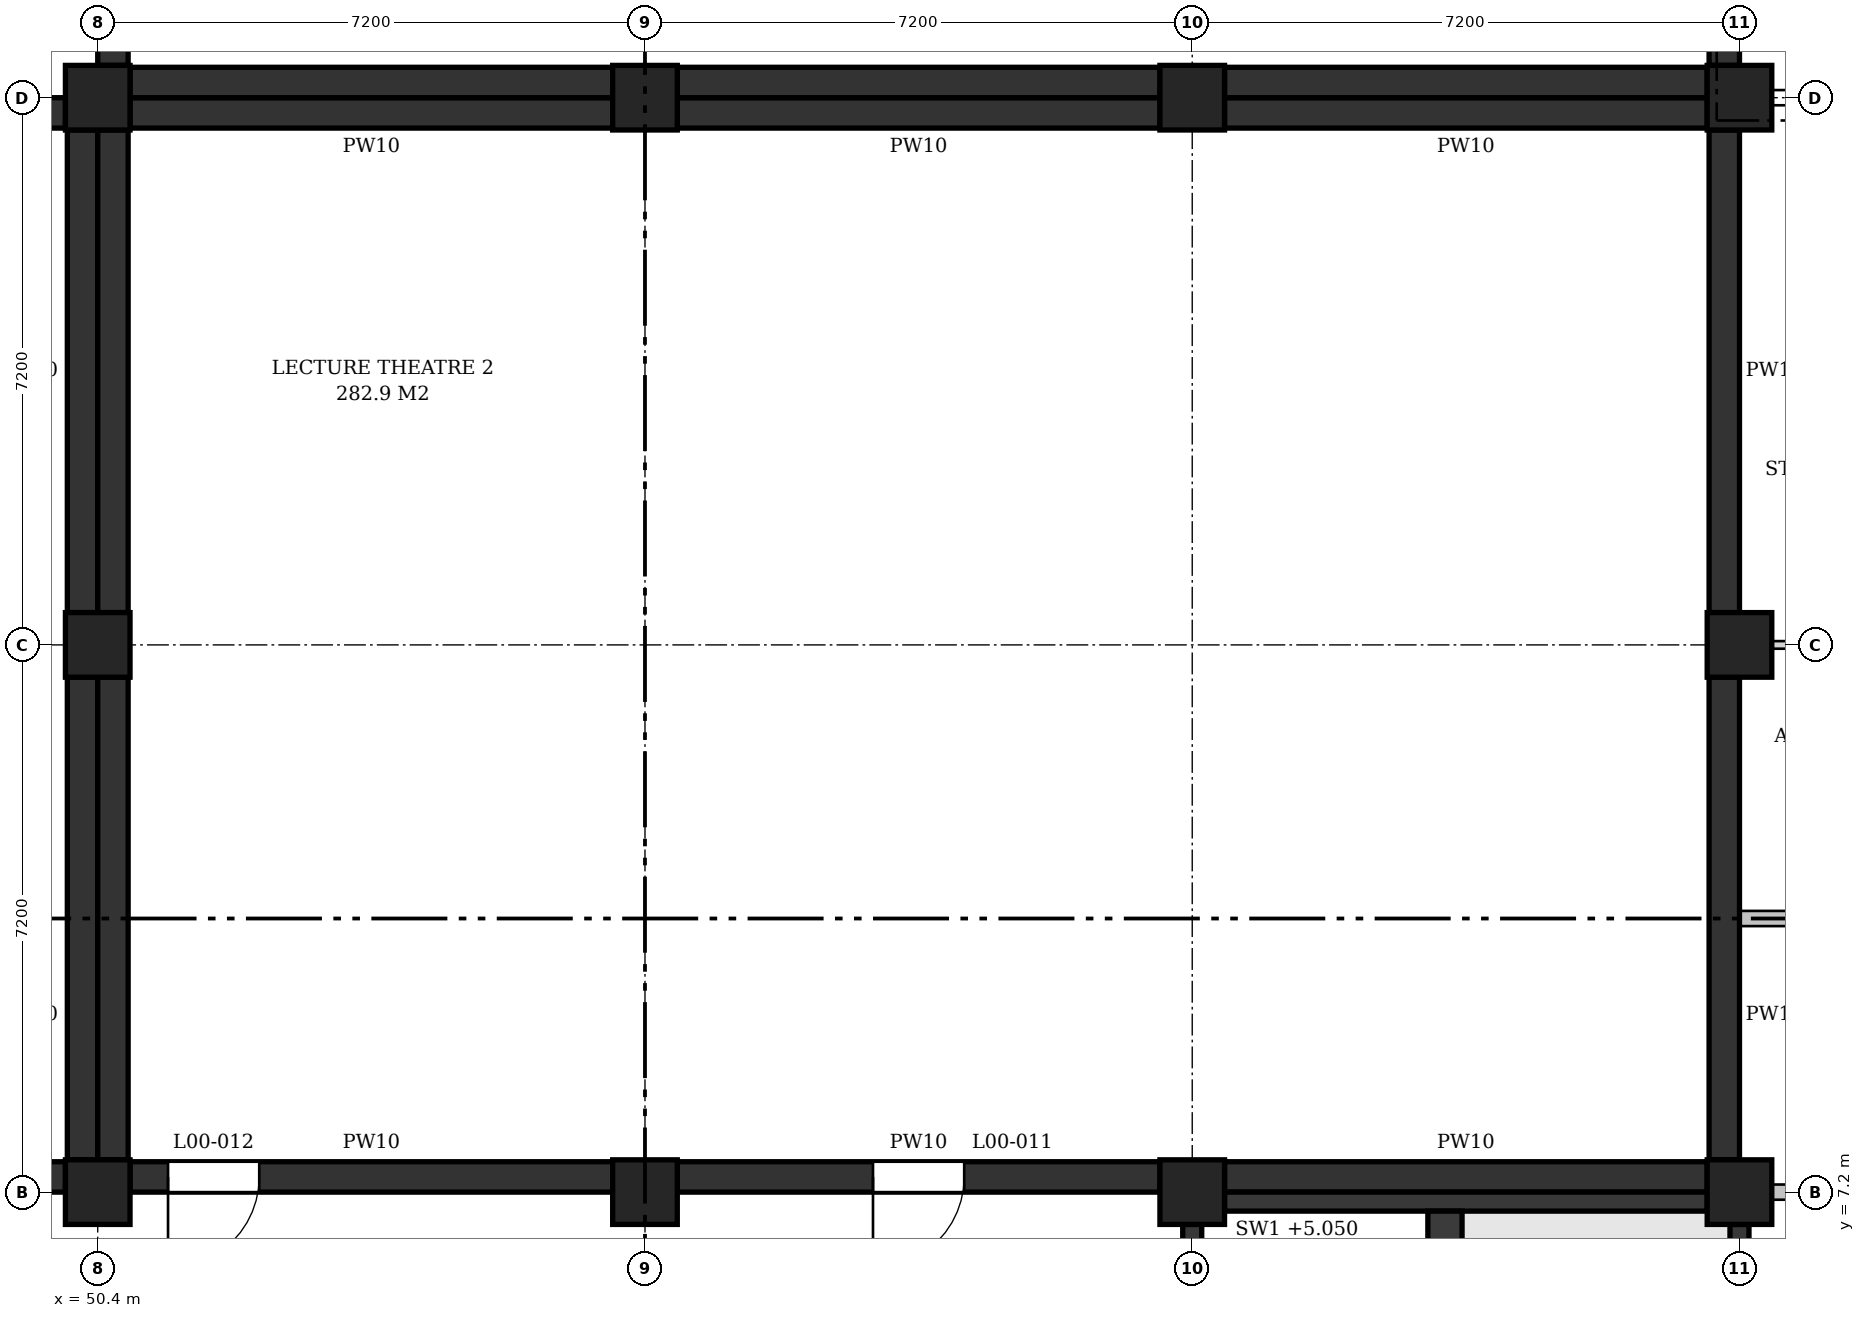
"""IFC4 building model, lengths in metres.
Left out: names, types, materials, properties, quantities, classifications, styles, units other than length and angle.
Written with IfcOpenShell. Run it as: python <this file> out.ifc"""

import sys

from ifc_helpers import new_model, si_unit, direction, frame, frame_2d, origin, origin_2d, place, context, subcontext, project, spatial, polyline, rectangle, outline, extrude, element, fill, save


model = new_model("IFC4")
c1 = context("Model", 3, precision=1e-05, world=origin(), true_north=direction((0.0, 1.0)))
c2 = subcontext(c1, "Body", "Model", "MODEL_VIEW")
j1 = project(units=[si_unit("LENGTHUNIT", "METRE"), si_unit("PLANEANGLEUNIT", "RADIAN")], contexts=[c1])
p1 = place(None, origin())
s1 = spatial("IfcSite", under=j1, at=p1, CompositionType="ELEMENT")
p2 = place(p1, origin())
s2 = spatial("IfcBuilding", under=s1, at=p2, CompositionType="ELEMENT")
p3 = place(p2, origin())
s3 = spatial("IfcBuildingStorey", under=s2, at=p3, CompositionType="ELEMENT", Elevation=0.0)
for number, where, z_axis, x_axis in (
    (1, (50.4, 7.2, 0.0), (0.0, 0.0, 1.0), (1.0, 0.0, 0.0)),
    (2, (50.4, 14.4, 0.0), (0.0, 0.0, 1.0), (1.0, 0.0, 0.0)),
    (3, (50.4, 21.6, 0.0), (0.0, 0.0, 1.0), (1.0, 0.0, 0.0)),
    (4, (57.6, 7.2, 0.0), (0.0, 0.0, 1.0), (1.0, 0.0, 0.0)),
    (5, (57.6, 21.6, 0.0), (0.0, 0.0, 1.0), (1.0, 0.0, 0.0)),
    (6, (64.8, 7.2, 0.0), (0.0, 0.0, 1.0), (1.0, 0.0, 0.0)),
    (7, (64.8, 21.6, 0.0), (0.0, 0.0, 1.0), (1.0, 0.0, 0.0)),
    (8, (72.0, 7.2, 0.0), (0.0, 0.0, 1.0), (1.0, 0.0, 0.0)),
    (9, (72.0, 14.4, 0.0), (0.0, 0.0, 1.0), (1.0, 0.0, 0.0)),
    (10, (72.0, 21.6, 0.0), (0.0, 0.0, 1.0), (1.0, 0.0, 0.0)),
):
    element("IfcColumn", number, at=place(p3, frame(where, z_axis=z_axis, x_axis=x_axis)), inside=s3, PredefinedType="COLUMN", context=c2, shape_type="SweptSolid", body=[
        extrude(rectangle(XDim=0.85, YDim=0.85, at=origin_2d()), origin(), (0.0, 0.0, 1.0), 6.0),
    ])
p4 = place(p3, frame((65.225, 7.075, 0.0), z_axis=(0.0, 0.0, 1.0), x_axis=(1.0, 0.0, 0.0)))
e11 = element("IfcWall", 11, at=p4, inside=s3, PredefinedType="SHEAR", context=c2, shape_type="SweptSolid", body=[
    extrude(rectangle(XDim=6.35, YDim=0.25, at=frame_2d((3.175, 0.0))), origin(), (0.0, 0.0, 1.0), 5.05),
])
p5 = place(p3, frame((72.0, 0.425, 0.0), z_axis=(0.0, 0.0, 1.0), x_axis=(0.0, 1.0, 0.0)))
e12 = element("IfcWall", 12, at=p5, inside=s3, PredefinedType="SHEAR", context=c2, shape_type="SweptSolid", body=[
    extrude(rectangle(XDim=6.35, YDim=0.25, at=frame_2d((3.175, 0.0))), origin(), (0.0, 0.0, 1.0), 5.0),
])
p6 = place(p3, frame((64.8, 0.425, 0.0), z_axis=(0.0, 0.0, 1.0), x_axis=(0.0, 1.0, 0.0)))
e13 = element("IfcWall", 13, at=p6, inside=s3, PredefinedType="SHEAR", context=c2, shape_type="SweptSolid", body=[
    extrude(rectangle(XDim=6.35, YDim=0.25, at=frame_2d((3.175, 0.0))), origin(), (0.0, 0.0, 1.0), 5.0),
])
p7 = place(p6, frame((3.975, 0.0, 0.0)))
e14 = element("IfcOpeningElement", 14, at=p7, cuts=e13, PredefinedType="OPENING", context=c2, shape_type="SweptSolid", body=[
    extrude(rectangle(XDim=1.1, YDim=2.1, at=frame_2d((0.55, 1.05))), frame((0.0, 0.135, 0.0), z_axis=(0.0, -1.0, 0.0), x_axis=(1.0, 0.0, 0.0)), (0.0, 0.0, 1.0), 0.27),
])
p8 = place(p3, frame((68.125, 0.15, 0.0), z_axis=(0.0, 0.0, 1.0), x_axis=(0.0, 1.0, 0.0)))
e15 = element("IfcWall", 15, at=p8, inside=s3, PredefinedType="SHEAR", context=c2, shape_type="SweptSolid", body=[
    extrude(rectangle(XDim=6.8, YDim=0.45, at=frame_2d((3.4, 0.0))), origin(), (0.0, 0.0, 1.0), 5.75),
])
p9 = place(p8, frame((5.4, 0.0, 0.0)))
e16 = element("IfcOpeningElement", 16, at=p9, cuts=e15, PredefinedType="OPENING", context=c2, shape_type="SweptSolid", body=[
    extrude(rectangle(XDim=1.0, YDim=2.1, at=frame_2d((0.5, 1.05))), frame((0.0, 0.235, 0.0), z_axis=(0.0, -1.0, 0.0), x_axis=(1.0, 0.0, 0.0)), (0.0, 0.0, 1.0), 0.47),
])
p10 = place(p3, frame((72.425, 7.2, 0.0), z_axis=(0.0, 0.0, 1.0), x_axis=(1.0, 0.0, 0.0)))
e17 = element("IfcWall", 17, at=p10, inside=s3, PredefinedType="PARTITIONING", context=c2, shape_type="SweptSolid", body=[
    extrude(rectangle(XDim=6.35, YDim=0.2, at=frame_2d((3.175, 0.0))), origin(), (0.0, 0.0, 1.0), 5.0),
])
p11 = place(p10, frame((2.675, 0.0, 0.0)))
e18 = element("IfcOpeningElement", 18, at=p11, cuts=e17, PredefinedType="OPENING", context=c2, shape_type="SweptSolid", body=[
    extrude(rectangle(XDim=1.0, YDim=2.1, at=frame_2d((0.5, 1.05))), frame((0.0, 0.11, 0.0), z_axis=(0.0, -1.0, 0.0), x_axis=(1.0, 0.0, 0.0)), (0.0, 0.0, 1.0), 0.22),
])
p12 = place(p3, frame((43.625, 7.4, 0.0), z_axis=(0.0, 0.0, 1.0), x_axis=(1.0, 0.0, 0.0)))
e19 = element("IfcWall", 19, at=p12, inside=s3, PredefinedType="SOLIDWALL", context=c2, shape_type="SweptSolid", body=[
    extrude(rectangle(XDim=6.35, YDim=0.4, at=frame_2d((3.175, 0.0))), origin(), (0.0, 0.0, 1.0), 10.7),
])
p13 = place(p12, frame((2.575, 0.0, 0.0)))
e20 = element("IfcOpeningElement", 20, at=p13, cuts=e19, PredefinedType="OPENING", context=c2, shape_type="SweptSolid", body=[
    extrude(rectangle(XDim=1.2, YDim=2.1, at=frame_2d((0.6, 1.05))), frame((0.0, 0.21, 0.0), z_axis=(0.0, -1.0, 0.0), x_axis=(1.0, 0.0, 0.0)), (0.0, 0.0, 1.0), 0.42),
])
p14 = place(p3, frame((50.825, 7.4, 0.0), z_axis=(0.0, 0.0, 1.0), x_axis=(1.0, 0.0, 0.0)))
e21 = element("IfcWall", 21, at=p14, inside=s3, PredefinedType="SOLIDWALL", context=c2, shape_type="SweptSolid", body=[
    extrude(rectangle(XDim=6.35, YDim=0.4, at=frame_2d((3.175, 0.0))), origin(), (0.0, 0.0, 1.0), 10.7),
])
p15 = place(p14, frame((0.5, 0.0, 0.0)))
e22 = element("IfcOpeningElement", 22, at=p15, cuts=e21, PredefinedType="OPENING", context=c2, shape_type="SweptSolid", body=[
    extrude(rectangle(XDim=1.2, YDim=2.1, at=frame_2d((0.6, 1.05))), frame((0.0, 0.21, 0.0), z_axis=(0.0, -1.0, 0.0), x_axis=(1.0, 0.0, 0.0)), (0.0, 0.0, 1.0), 0.42),
])
p16 = place(p3, frame((58.025, 7.4, 0.0), z_axis=(0.0, 0.0, 1.0), x_axis=(1.0, 0.0, 0.0)))
e23 = element("IfcWall", 23, at=p16, inside=s3, PredefinedType="SOLIDWALL", context=c2, shape_type="SweptSolid", body=[
    extrude(rectangle(XDim=6.35, YDim=0.4, at=frame_2d((3.175, 0.0))), origin(), (0.0, 0.0, 1.0), 10.7),
])
p17 = place(p16, frame((2.575, 0.0, 0.0)))
e24 = element("IfcOpeningElement", 24, at=p17, cuts=e23, PredefinedType="OPENING", context=c2, shape_type="SweptSolid", body=[
    extrude(rectangle(XDim=1.2, YDim=2.1, at=frame_2d((0.6, 1.05))), frame((0.0, 0.21, 0.0), z_axis=(0.0, -1.0, 0.0), x_axis=(1.0, 0.0, 0.0)), (0.0, 0.0, 1.0), 0.42),
])
p18 = place(p3, frame((65.225, 7.4, 0.0), z_axis=(0.0, 0.0, 1.0), x_axis=(1.0, 0.0, 0.0)))
e25 = element("IfcWall", 25, at=p18, inside=s3, PredefinedType="SOLIDWALL", context=c2, shape_type="SweptSolid", body=[
    extrude(rectangle(XDim=6.35, YDim=0.4, at=frame_2d((3.175, 0.0))), origin(), (0.0, 0.0, 1.0), 10.7),
])
p19 = place(p3, frame((72.0, 10.8, 0.0), z_axis=(0.0, 0.0, 1.0), x_axis=(1.0, 0.0, 0.0)))
e26 = element("IfcWall", 26, at=p19, inside=s3, PredefinedType="PARTITIONING", context=c2, shape_type="SweptSolid", body=[
    extrude(outline(polyline([(0.0, 0.0), (7.3, 0.0), (7.3, 5.0), (6.95, 5.0), (6.95, 5.75), (0.55, 5.75), (0.55, 5.05), (0.0, 5.05), (0.0, 0.0)])), frame((0.0, 0.1, 0.0), z_axis=(0.0, -1.0, 0.0), x_axis=(1.0, 0.0, 0.0)), (0.0, 0.0, 1.0), 0.2),
])
p20 = place(p19, frame((1.3, 0.0, 0.0)))
e27 = element("IfcOpeningElement", 27, at=p20, cuts=e26, PredefinedType="OPENING", context=c2, shape_type="SweptSolid", body=[
    extrude(rectangle(XDim=1.0, YDim=2.1, at=frame_2d((0.5, 1.05))), frame((0.0, 0.11, 0.0), z_axis=(0.0, -1.0, 0.0), x_axis=(1.0, 0.0, 0.0)), (0.0, 0.0, 1.0), 0.22),
])
p21 = place(p19, frame((4.9, 0.0, 0.0)))
e28 = element("IfcOpeningElement", 28, at=p21, cuts=e26, PredefinedType="OPENING", context=c2, shape_type="SweptSolid", body=[
    extrude(rectangle(XDim=1.0, YDim=2.1, at=frame_2d((0.5, 1.05))), frame((0.0, 0.11, 0.0), z_axis=(0.0, -1.0, 0.0), x_axis=(1.0, 0.0, 0.0)), (0.0, 0.0, 1.0), 0.22),
])
p22 = place(p3, frame((72.425, 14.4, 0.0), z_axis=(0.0, 0.0, 1.0), x_axis=(1.0, 0.0, 0.0)))
e29 = element("IfcWall", 29, at=p22, inside=s3, PredefinedType="PARTITIONING", context=c2, shape_type="SweptSolid", body=[
    extrude(rectangle(XDim=3.175, YDim=0.1, at=frame_2d((1.587, 0.0))), origin(), (0.0, 0.0, 1.0), 5.0),
])
p23 = place(p3, frame((43.625, 21.4, 0.0), z_axis=(0.0, 0.0, 1.0), x_axis=(1.0, 0.0, 0.0)))
e30 = element("IfcWall", 30, at=p23, inside=s3, PredefinedType="SOLIDWALL", context=c2, shape_type="SweptSolid", body=[
    extrude(rectangle(XDim=6.35, YDim=0.4, at=frame_2d((3.175, 0.0))), origin(), (0.0, 0.0, 1.0), 10.7),
])
p24 = place(p23, frame((2.175, 0.0, 0.0)))
e31 = element("IfcOpeningElement", 31, at=p24, cuts=e30, PredefinedType="OPENING", context=c2, shape_type="SweptSolid", body=[
    extrude(rectangle(XDim=2.0, YDim=2.4, at=frame_2d((1.0, 1.2))), frame((0.0, 0.21, 0.0), z_axis=(0.0, -1.0, 0.0), x_axis=(1.0, 0.0, 0.0)), (0.0, 0.0, 1.0), 0.42),
])
for number, where, z_axis, x_axis in (
    (32, (50.825, 21.4, 0.0), (0.0, 0.0, 1.0), (1.0, 0.0, 0.0)),
    (33, (58.025, 21.4, 0.0), (0.0, 0.0, 1.0), (1.0, 0.0, 0.0)),
):
    element("IfcWall", number, at=place(p3, frame(where, z_axis=z_axis, x_axis=x_axis)), inside=s3, PredefinedType="SOLIDWALL", context=c2, shape_type="SweptSolid", body=[
        extrude(rectangle(XDim=6.35, YDim=0.4, at=frame_2d((3.175, 0.0))), origin(), (0.0, 0.0, 1.0), 10.7),
    ])
p25 = place(p3, frame((65.225, 21.4, 0.0), z_axis=(0.0, 0.0, 1.0), x_axis=(1.0, 0.0, 0.0)))
e34 = element("IfcWall", 34, at=p25, inside=s3, PredefinedType="SOLIDWALL", context=c2, shape_type="SweptSolid", body=[
    extrude(rectangle(XDim=6.35, YDim=0.4, at=frame_2d((3.175, 0.0))), origin(), (0.0, 0.0, 1.0), 10.7),
])
p26 = place(p3, frame((72.425, 21.6, 0.0), z_axis=(0.0, 0.0, 1.0), x_axis=(1.0, 0.0, 0.0)))
e35 = element("IfcWall", 35, at=p26, inside=s3, PredefinedType="PARTITIONING", context=c2, shape_type="SweptSolid", body=[
    extrude(rectangle(XDim=6.35, YDim=0.2, at=frame_2d((3.175, 0.0))), origin(), (0.0, 0.0, 1.0), 5.0),
])
for number, where, z_axis, x_axis in (
    (36, (50.825, 21.8, 0.0), (0.0, 0.0, 1.0), (1.0, 0.0, 0.0)),
    (37, (58.025, 21.8, 0.0), (0.0, 0.0, 1.0), (1.0, 0.0, 0.0)),
):
    element("IfcWall", number, at=place(p3, frame(where, z_axis=z_axis, x_axis=x_axis)), inside=s3, PredefinedType="SOLIDWALL", context=c2, shape_type="SweptSolid", body=[
        extrude(rectangle(XDim=6.35, YDim=0.4, at=frame_2d((3.175, 0.0))), origin(), (0.0, 0.0, 1.0), 10.7),
    ])
p27 = place(p3, frame((65.225, 21.8, 0.0), z_axis=(0.0, 0.0, 1.0), x_axis=(1.0, 0.0, 0.0)))
e38 = element("IfcWall", 38, at=p27, inside=s3, PredefinedType="SOLIDWALL", context=c2, shape_type="SweptSolid", body=[
    extrude(rectangle(XDim=6.35, YDim=0.4, at=frame_2d((3.175, 0.0))), origin(), (0.0, 0.0, 1.0), 10.7),
])
for number, where, z_axis, x_axis in (
    (39, (50.2, 7.625, 0.0), (0.0, 0.0, 1.0), (0.0, 1.0, 0.0)),
    (40, (50.2, 14.825, 0.0), (0.0, 0.0, 1.0), (0.0, 1.0, 0.0)),
    (41, (50.6, 7.625, 0.0), (0.0, 0.0, 1.0), (0.0, 1.0, 0.0)),
    (42, (50.6, 14.825, 0.0), (0.0, 0.0, 1.0), (0.0, 1.0, 0.0)),
):
    element("IfcWall", number, at=place(p3, frame(where, z_axis=z_axis, x_axis=x_axis)), inside=s3, PredefinedType="SOLIDWALL", context=c2, shape_type="SweptSolid", body=[
        extrude(rectangle(XDim=6.35, YDim=0.4, at=frame_2d((3.175, 0.0))), origin(), (0.0, 0.0, 1.0), 10.7),
    ])
p28 = place(p3, frame((50.6, 22.025, 0.0), z_axis=(0.0, 0.0, 1.0), x_axis=(0.0, 1.0, 0.0)))
e43 = element("IfcWall", 43, at=p28, inside=s3, PredefinedType="SOLIDWALL", context=c2, shape_type="SweptSolid", body=[
    extrude(rectangle(XDim=6.35, YDim=0.4, at=frame_2d((3.175, 0.0))), origin(), (0.0, 0.0, 1.0), 10.7),
])
p29 = place(p28, frame((2.175, 0.0, 0.0)))
e44 = element("IfcOpeningElement", 44, at=p29, cuts=e43, PredefinedType="OPENING", context=c2, shape_type="SweptSolid", body=[
    extrude(rectangle(XDim=2.0, YDim=2.4, at=frame_2d((1.0, 1.2))), frame((0.0, 0.21, 0.0), z_axis=(0.0, -1.0, 0.0), x_axis=(1.0, 0.0, 0.0)), (0.0, 0.0, 1.0), 0.42),
])
for number, where, z_axis, x_axis in (
    (45, (71.8, 7.625, 0.0), (0.0, 0.0, 1.0), (0.0, 1.0, 0.0)),
    (46, (71.8, 14.825, 0.0), (0.0, 0.0, 1.0), (0.0, 1.0, 0.0)),
    (47, (71.8, 22.025, 0.0), (0.0, 0.0, 1.0), (0.0, 1.0, 0.0)),
):
    element("IfcWall", number, at=place(p3, frame(where, z_axis=z_axis, x_axis=x_axis)), inside=s3, PredefinedType="SOLIDWALL", context=c2, shape_type="SweptSolid", body=[
        extrude(rectangle(XDim=6.35, YDim=0.4, at=frame_2d((3.175, 0.0))), origin(), (0.0, 0.0, 1.0), 10.55),
    ])
p30 = place(p17, frame((1.2, 0.0, 0.0), z_axis=(0.0, 0.0, 1.0), x_axis=(-1.0, 0.0, 0.0)))
e48 = element("IfcDoor", 48, at=p30, inside=s3, OperationType="SINGLE_SWING_RIGHT", PredefinedType="DOOR", context=c2, shape_type="SweptSolid", body=[
    extrude(rectangle(XDim=1.2, YDim=2.1, at=frame_2d((0.6, 1.05))), frame((0.0, 0.025, 0.0), z_axis=(0.0, -1.0, 0.0), x_axis=(1.0, 0.0, 0.0)), (0.0, 0.0, 1.0), 0.05),
])
fill(e24, e48)
p31 = place(p15, frame((1.2, 0.0, 0.0), z_axis=(0.0, 0.0, 1.0), x_axis=(-1.0, 0.0, 0.0)))
e49 = element("IfcDoor", 49, at=p31, inside=s3, OperationType="SINGLE_SWING_RIGHT", PredefinedType="DOOR", context=c2, shape_type="SweptSolid", body=[
    extrude(rectangle(XDim=1.2, YDim=2.1, at=frame_2d((0.6, 1.05))), frame((0.0, 0.025, 0.0), z_axis=(0.0, -1.0, 0.0), x_axis=(1.0, 0.0, 0.0)), (0.0, 0.0, 1.0), 0.05),
])
fill(e22, e49)
save(model, sys.argv[1])
